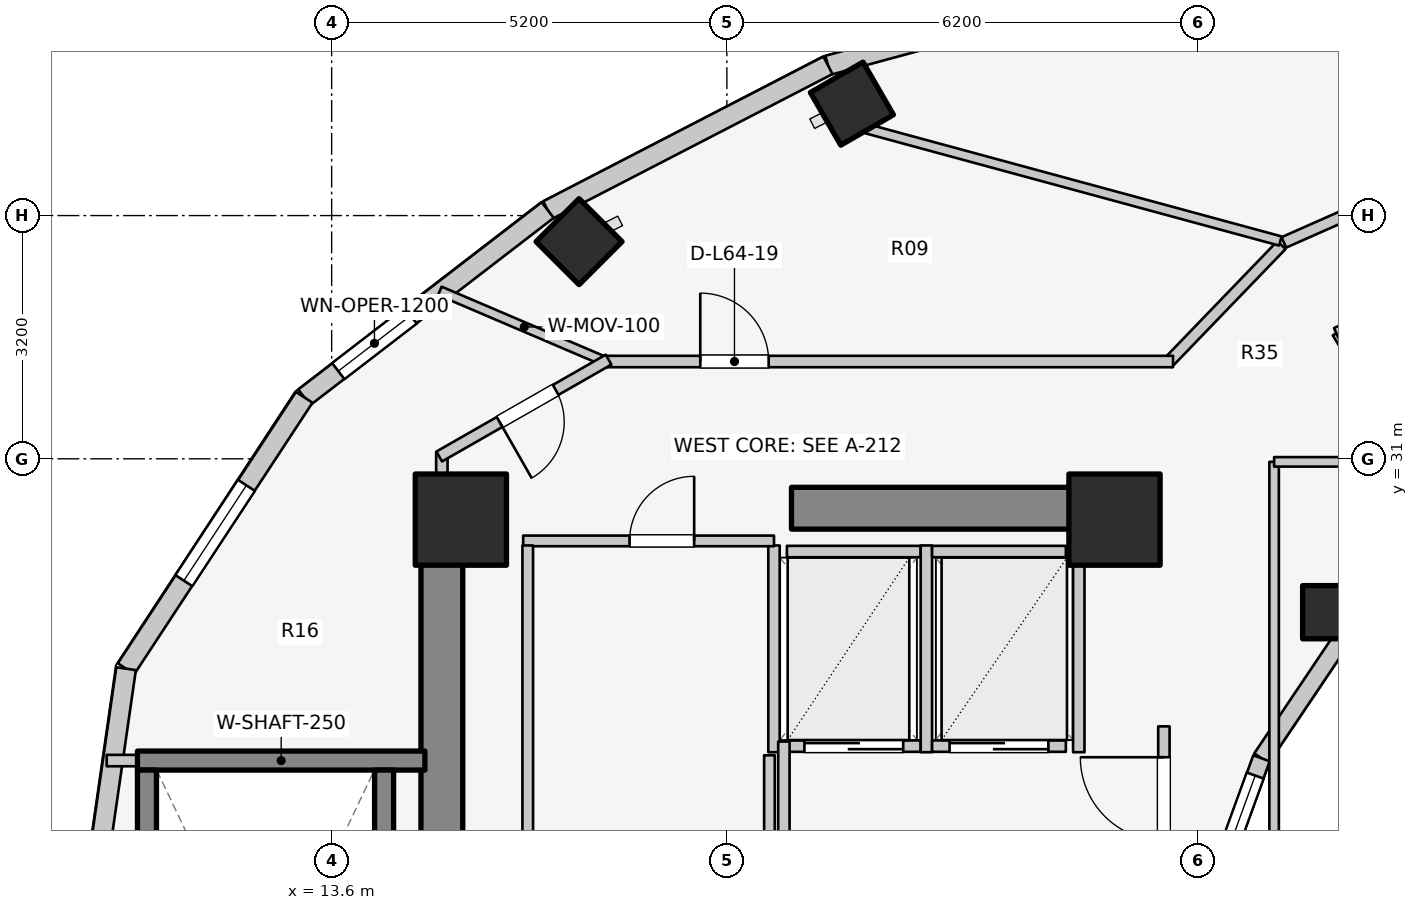
"""IFC4 building model, lengths in metres.
Left out: names, types, materials, properties, quantities, classifications, styles, units other than length and angle.
Written with IfcOpenShell. Run it as: python <this file> out.ifc"""

import sys

from ifc_helpers import new_model, si_unit, direction, frame, frame_2d, origin, origin_2d, place, context, subcontext, project, spatial, rectangle, extrude, element, fill, save


model = new_model("IFC4")
c1 = context("Model", 3, precision=1e-05, world=origin(), true_north=direction((0.0, 1.0)))
c2 = subcontext(c1, "Body", "Model", "MODEL_VIEW")
j1 = project(units=[si_unit("LENGTHUNIT", "METRE"), si_unit("PLANEANGLEUNIT", "RADIAN")], contexts=[c1])
p1 = place(None, origin())
s1 = spatial("IfcSite", under=j1, at=p1, CompositionType="ELEMENT")
p2 = place(p1, origin())
s2 = spatial("IfcBuilding", under=s1, at=p2, CompositionType="ELEMENT")
p3 = place(p2, frame((0.0, 0.0, 210.9)))
s3 = spatial("IfcBuildingStorey", under=s2, at=p3, CompositionType="ELEMENT", Elevation=210.9)
p4 = place(p3, frame((15.05, 17.05, 0.0), z_axis=(0.0, 0.0, 1.0), x_axis=(0.0, 1.0, 0.0)))
e1 = element("IfcWall", 1, at=p4, inside=s3, PredefinedType="SHEAR", context=c2, shape_type="SweptSolid", body=[
    extrude(rectangle(XDim=12.8, YDim=0.55, at=frame_2d((6.4, 0.0))), origin(), (0.0, 0.0, 1.0), 3.1),
])
p5 = place(p3, frame((19.65, 30.35, 0.0), z_axis=(0.0, 0.0, 1.0), x_axis=(1.0, 0.0, 0.0)))
e2 = element("IfcWall", 2, at=p5, inside=s3, PredefinedType="SHEAR", context=c2, shape_type="SweptSolid", body=[
    extrude(rectangle(XDim=4.5, YDim=0.55, at=frame_2d((2.25, 0.0))), origin(), (0.0, 0.0, 1.0), 3.1),
])
p6 = place(p3, frame((11.045, 27.03, 0.0), z_axis=(0.0, 0.0, 1.0), x_axis=(1.0, 0.0, 0.0)))
e3 = element("IfcWall", 3, at=p6, inside=s3, PredefinedType="SOLIDWALL", context=c2, shape_type="SweptSolid", body=[
    extrude(rectangle(XDim=3.782, YDim=0.25, at=frame_2d((1.891, 0.0))), origin(), (0.0, 0.0, 1.0), 3.1),
])
for number, where, z_axis, x_axis in (
    (4, (11.17, 19.095, 0.0), (0.0, 0.0, 1.0), (0.0, 1.0, 0.0)),
    (5, (14.29, 19.095, 0.0), (0.0, 0.0, 1.0), (0.0, 1.0, 0.0)),
):
    element("IfcWall", number, at=place(p3, frame(where, z_axis=z_axis, x_axis=x_axis)), inside=s3, PredefinedType="SOLIDWALL", context=c2, shape_type="SweptSolid", body=[
        extrude(rectangle(XDim=7.81, YDim=0.25, at=frame_2d((3.905, 0.0))), origin(), (0.0, 0.0, 1.0), 3.1),
    ])
for number, where, z_axis, x_axis in (
    (6, (23.9, 30.2, 0.0), (0.0, 0.0, 1.0), (1.0, 0.0, 0.0)),
    (7, (15.3, 30.2, 0.0), (0.0, 0.0, 1.0), (1.0, 0.0, 0.0)),
):
    element("IfcColumn", number, at=place(p3, frame(where, z_axis=z_axis, x_axis=x_axis)), inside=s3, PredefinedType="COLUMN", context=c2, shape_type="SweptSolid", body=[
        extrude(rectangle(XDim=1.2, YDim=1.2, at=origin_2d()), origin(), (0.0, 0.0, 1.0), 3.1),
    ])
p7 = place(p3, frame((20.445, 35.673, 0.0), z_axis=(0.0, 0.0, 1.0), x_axis=(-0.5, 0.866025403784, 0.0)))
e8 = element("IfcColumn", 8, at=p7, inside=s3, PredefinedType="COLUMN", context=c2, shape_type="SweptSolid", body=[
    extrude(rectangle(XDim=0.8, YDim=0.8, at=origin_2d()), origin(), (0.0, 0.0, 1.0), 3.1),
])
p8 = place(p3, frame((26.725, 28.982, 0.0), z_axis=(0.0, 0.0, 1.0), x_axis=(1.0, 0.0, 0.0)))
e9 = element("IfcColumn", 9, at=p8, inside=s3, PredefinedType="COLUMN", context=c2, shape_type="SweptSolid", body=[
    extrude(rectangle(XDim=0.7, YDim=0.7, at=origin_2d()), origin(), (0.0, 0.0, 1.0), 3.1),
])
p9 = place(p3, frame((16.855, 33.857, 0.0), z_axis=(0.0, 0.0, 1.0), x_axis=(-0.707106781187, 0.707106781187, 0.0)))
e10 = element("IfcColumn", 10, at=p9, inside=s3, PredefinedType="COLUMN", context=c2, shape_type="SweptSolid", body=[
    extrude(rectangle(XDim=0.8, YDim=0.8, at=origin_2d()), origin(), (0.0, 0.0, 1.0), 3.1),
])
p10 = place(p3, frame((26.965, 28.742, 0.0), z_axis=(0.0, 0.0, 1.0), x_axis=(-0.558197800898, -0.829707909492, 0.0)))
e11 = element("IfcWall", 11, at=p10, inside=s3, PredefinedType="STANDARD", context=c2, shape_type="SweptSolid", body=[
    extrude(rectangle(XDim=2.027, YDim=0.23, at=frame_2d((1.013, 0.0))), origin(), (0.0, 0.0, 1.0), 2.16),
])
p11 = place(p3, frame((25.834, 27.06, 0.0), z_axis=(0.0, 0.0, 1.0), x_axis=(-0.341423187295, -0.93990968033, 0.0)))
e12 = element("IfcWall", 12, at=p11, inside=s3, PredefinedType="STANDARD", context=c2, shape_type="SweptSolid", body=[
    extrude(rectangle(XDim=2.084, YDim=0.23, at=frame_2d((1.042, 0.0))), origin(), (0.0, 0.0, 1.0), 2.84),
])
p12 = place(p11, frame((0.242, 0.0, 0.85)))
e13 = element("IfcOpeningElement", 13, at=p12, cuts=e12, PredefinedType="OPENING", context=c2, shape_type="SweptSolid", body=[
    extrude(rectangle(XDim=1.6, YDim=1.65, at=frame_2d((0.8, 0.825))), frame((0.0, 0.125, 0.0), z_axis=(0.0, -1.0, 0.0), x_axis=(1.0, 0.0, 0.0)), (0.0, 0.0, 1.0), 0.25),
])
p13 = place(p3, frame((24.957, 37.485, 0.0), z_axis=(0.0, 0.0, 1.0), x_axis=(-0.965213026382, -0.261464746576, 0.0)))
e14 = element("IfcWall", 14, at=p13, inside=s3, PredefinedType="STANDARD", context=c2, shape_type="SweptSolid", body=[
    extrude(rectangle(XDim=5.001, YDim=0.26, at=frame_2d((2.5, 0.0))), origin(), (0.0, 0.0, 1.0), 2.85),
])
p14 = place(p13, frame((1.75, 0.0, 0.75)))
e15 = element("IfcOpeningElement", 15, at=p14, cuts=e14, PredefinedType="OPENING", context=c2, shape_type="SweptSolid", body=[
    extrude(rectangle(XDim=1.5, YDim=1.6, at=frame_2d((0.75, 0.8))), frame((0.0, 0.14, 0.0), z_axis=(0.0, -1.0, 0.0), x_axis=(1.0, 0.0, 0.0)), (0.0, 0.0, 1.0), 0.28),
])
p15 = place(p3, frame((20.13, 36.177, 0.0), z_axis=(0.0, 0.0, 1.0), x_axis=(-0.88849146803, -0.458893137057, 0.0)))
e16 = element("IfcWall", 16, at=p15, inside=s3, PredefinedType="STANDARD", context=c2, shape_type="SweptSolid", body=[
    extrude(rectangle(XDim=4.15, YDim=0.26, at=frame_2d((2.075, 0.0))), origin(), (0.0, 0.0, 1.0), 2.85),
])
p16 = place(p3, frame((16.442, 34.272, 0.0), z_axis=(0.0, 0.0, 1.0), x_axis=(-0.792713817907, -0.609593965603, 0.0)))
e17 = element("IfcWall", 17, at=p16, inside=s3, PredefinedType="STANDARD", context=c2, shape_type="SweptSolid", body=[
    extrude(rectangle(XDim=4.041, YDim=0.26, at=frame_2d((2.021, 0.0))), origin(), (0.0, 0.0, 1.0), 2.85),
])
p17 = place(p16, frame((2.275, 0.0, 0.75)))
e18 = element("IfcOpeningElement", 18, at=p17, cuts=e17, PredefinedType="OPENING", context=c2, shape_type="SweptSolid", body=[
    extrude(rectangle(XDim=1.2, YDim=1.5, at=frame_2d((0.6, 0.75))), frame((0.0, 0.14, 0.0), z_axis=(0.0, -1.0, 0.0), x_axis=(1.0, 0.0, 0.0)), (0.0, 0.0, 1.0), 0.28),
])
p18 = place(p3, frame((13.239, 31.809, 0.0), z_axis=(0.0, 0.0, 1.0), x_axis=(-0.548776305075, -0.835969238064, 0.0)))
e19 = element("IfcWall", 19, at=p18, inside=s3, PredefinedType="STANDARD", context=c2, shape_type="SweptSolid", body=[
    extrude(rectangle(XDim=4.271, YDim=0.26, at=frame_2d((2.135, 0.0))), origin(), (0.0, 0.0, 1.0), 2.85),
])
p19 = place(p18, frame((1.385, 0.0, 0.75)))
e20 = element("IfcOpeningElement", 20, at=p19, cuts=e19, PredefinedType="OPENING", context=c2, shape_type="SweptSolid", body=[
    extrude(rectangle(XDim=1.5, YDim=1.6, at=frame_2d((0.75, 0.8))), frame((0.0, 0.14, 0.0), z_axis=(0.0, -1.0, 0.0), x_axis=(1.0, 0.0, 0.0)), (0.0, 0.0, 1.0), 0.28),
])
p20 = place(p3, frame((10.895, 28.239, 0.0), z_axis=(0.0, 0.0, 1.0), x_axis=(-0.142712754019, -0.989764148593, 0.0)))
e21 = element("IfcWall", 21, at=p20, inside=s3, PredefinedType="STANDARD", context=c2, shape_type="SweptSolid", body=[
    extrude(rectangle(XDim=5.293, YDim=0.26, at=frame_2d((2.646, 0.0))), origin(), (0.0, 0.0, 1.0), 2.85),
])
p21 = place(p20, frame((2.635, 0.0, 0.75)))
e22 = element("IfcOpeningElement", 22, at=p21, cuts=e21, PredefinedType="OPENING", context=c2, shape_type="SweptSolid", body=[
    extrude(rectangle(XDim=1.2, YDim=1.5, at=frame_2d((0.6, 0.75))), frame((0.0, 0.14, 0.0), z_axis=(0.0, -1.0, 0.0), x_axis=(1.0, 0.0, 0.0)), (0.0, 0.0, 1.0), 0.28),
])
p22 = place(p3, frame((19.59, 27.22, 0.0), z_axis=(0.0, 0.0, 1.0), x_axis=(1.0, 0.0, 0.0)))
e23 = element("IfcWall", 23, at=p22, inside=s3, PredefinedType="SOLIDWALL", context=c2, shape_type="SweptSolid", body=[
    extrude(rectangle(XDim=1.76, YDim=0.15, at=frame_2d((0.88, 0.0))), origin(), (0.0, 0.0, 1.0), 2.855),
])
p23 = place(p22, frame((0.23, 0.0, 0.0)))
e24 = element("IfcOpeningElement", 24, at=p23, cuts=e23, PredefinedType="OPENING", context=c2, shape_type="SweptSolid", body=[
    extrude(rectangle(XDim=1.3, YDim=2.1, at=frame_2d((0.65, 1.05))), frame((0.0, 0.085, 0.0), z_axis=(0.0, -1.0, 0.0), x_axis=(1.0, 0.0, 0.0)), (0.0, 0.0, 1.0), 0.17),
])
p24 = place(p3, frame((19.59, 29.78, 0.0), z_axis=(0.0, 0.0, 1.0), x_axis=(1.0, 0.0, 0.0)))
e25 = element("IfcWall", 25, at=p24, inside=s3, PredefinedType="SOLIDWALL", context=c2, shape_type="SweptSolid", body=[
    extrude(rectangle(XDim=1.76, YDim=0.15, at=frame_2d((0.88, 0.0))), origin(), (0.0, 0.0, 1.0), 2.855),
])
for number, where, z_axis, x_axis in (
    (26, (19.42, 27.14, 0.0), (0.0, 0.0, 1.0), (0.0, 1.0, 0.0)),
    (27, (21.425, 27.14, 0.0), (0.0, 0.0, 1.0), (0.0, 1.0, 0.0)),
):
    element("IfcWall", number, at=place(p3, frame(where, z_axis=z_axis, x_axis=x_axis)), inside=s3, PredefinedType="SOLIDWALL", context=c2, shape_type="SweptSolid", body=[
        extrude(rectangle(XDim=2.72, YDim=0.15, at=frame_2d((1.36, 0.0))), origin(), (0.0, 0.0, 1.0), 2.855),
    ])
p25 = place(p3, frame((21.5, 27.22, 0.0), z_axis=(0.0, 0.0, 1.0), x_axis=(1.0, 0.0, 0.0)))
e28 = element("IfcWall", 28, at=p25, inside=s3, PredefinedType="SOLIDWALL", context=c2, shape_type="SweptSolid", body=[
    extrude(rectangle(XDim=1.76, YDim=0.15, at=frame_2d((0.88, 0.0))), origin(), (0.0, 0.0, 1.0), 2.855),
])
p26 = place(p25, frame((0.23, 0.0, 0.0)))
e29 = element("IfcOpeningElement", 29, at=p26, cuts=e28, PredefinedType="OPENING", context=c2, shape_type="SweptSolid", body=[
    extrude(rectangle(XDim=1.3, YDim=2.1, at=frame_2d((0.65, 1.05))), frame((0.0, 0.085, 0.0), z_axis=(0.0, -1.0, 0.0), x_axis=(1.0, 0.0, 0.0)), (0.0, 0.0, 1.0), 0.17),
])
p27 = place(p3, frame((21.5, 29.78, 0.0), z_axis=(0.0, 0.0, 1.0), x_axis=(1.0, 0.0, 0.0)))
e30 = element("IfcWall", 30, at=p27, inside=s3, PredefinedType="SOLIDWALL", context=c2, shape_type="SweptSolid", body=[
    extrude(rectangle(XDim=1.76, YDim=0.15, at=frame_2d((0.88, 0.0))), origin(), (0.0, 0.0, 1.0), 2.855),
])
p28 = place(p3, frame((23.43, 27.14, 0.0), z_axis=(0.0, 0.0, 1.0), x_axis=(0.0, 1.0, 0.0)))
e31 = element("IfcWall", 31, at=p28, inside=s3, PredefinedType="SOLIDWALL", context=c2, shape_type="SweptSolid", body=[
    extrude(rectangle(XDim=2.72, YDim=0.15, at=frame_2d((1.36, 0.0))), origin(), (0.0, 0.0, 1.0), 2.855),
])
p29 = place(p3, frame((19.55, 24.08, 0.0), z_axis=(0.0, 0.0, 1.0), x_axis=(0.0, 1.0, 0.0)))
e32 = element("IfcWall", 32, at=p29, inside=s3, PredefinedType="PARTITIONING", context=c2, shape_type="SweptSolid", body=[
    extrude(rectangle(XDim=3.2, YDim=0.15, at=frame_2d((1.6, 0.0))), origin(), (0.0, 0.0, 1.0), 2.855),
])
p30 = place(p3, frame((24.55, 24.08, 0.0), z_axis=(0.0, 0.0, 1.0), x_axis=(0.0, 1.0, 0.0)))
e33 = element("IfcWall", 33, at=p30, inside=s3, PredefinedType="PARTITIONING", context=c2, shape_type="SweptSolid", body=[
    extrude(rectangle(XDim=3.4, YDim=0.15, at=frame_2d((1.7, 0.0))), origin(), (0.0, 0.0, 1.0), 2.855),
])
p31 = place(p30, frame((1.894, 0.0, 0.0)))
e34 = element("IfcOpeningElement", 34, at=p31, cuts=e33, PredefinedType="OPENING", context=c2, shape_type="SweptSolid", body=[
    extrude(rectangle(XDim=1.1, YDim=2.1, at=frame_2d((0.55, 1.05))), frame((0.0, 0.085, 0.0), z_axis=(0.0, -1.0, 0.0), x_axis=(1.0, 0.0, 0.0)), (0.0, 0.0, 1.0), 0.17),
])
p32 = place(p3, frame((16.12, 29.92, 0.0), z_axis=(0.0, 0.0, 1.0), x_axis=(1.0, 0.0, 0.0)))
e35 = element("IfcWall", 35, at=p32, inside=s3, PredefinedType="PLUMBINGWALL", context=c2, shape_type="SweptSolid", body=[
    extrude(rectangle(XDim=3.3, YDim=0.14, at=frame_2d((1.65, 0.0))), origin(), (0.0, 0.0, 1.0), 2.855),
])
p33 = place(p32, frame((1.399, 0.0, 0.0)))
e36 = element("IfcOpeningElement", 36, at=p33, cuts=e35, PredefinedType="OPENING", context=c2, shape_type="SweptSolid", body=[
    extrude(rectangle(XDim=0.85, YDim=2.05, at=frame_2d((0.425, 1.025))), frame((0.0, 0.08, 0.0), z_axis=(0.0, -1.0, 0.0), x_axis=(1.0, 0.0, 0.0)), (0.0, 0.0, 1.0), 0.16),
])
p34 = place(p3, frame((16.18, 25.98, 0.0), z_axis=(0.0, 0.0, 1.0), x_axis=(0.0, 1.0, 0.0)))
e37 = element("IfcWall", 37, at=p34, inside=s3, PredefinedType="PLUMBINGWALL", context=c2, shape_type="SweptSolid", body=[
    extrude(rectangle(XDim=3.88, YDim=0.14, at=frame_2d((1.94, 0.0))), origin(), (0.0, 0.0, 1.0), 2.855),
])
p35 = place(p3, frame((19.36, 25.98, 0.0), z_axis=(0.0, 0.0, 1.0), x_axis=(0.0, 1.0, 0.0)))
e38 = element("IfcWall", 38, at=p35, inside=s3, PredefinedType="PLUMBINGWALL", context=c2, shape_type="SweptSolid", body=[
    extrude(rectangle(XDim=1.12, YDim=0.14, at=frame_2d((0.56, 0.0))), origin(), (0.0, 0.0, 1.0), 2.855),
])
p36 = place(p3, frame((28.45, 30.015, 0.0), z_axis=(0.0, 0.0, 1.0), x_axis=(-0.523992004803, 0.851723182086, 0.0)))
e39 = element("IfcWall", 39, at=p36, inside=s3, PredefinedType="PARTITIONING", context=c2, shape_type="SweptSolid", body=[
    extrude(rectangle(XDim=3.101, YDim=0.125, at=frame_2d((1.551, 0.0))), origin(), (0.0, 0.0, 1.0), 2.376),
])
p37 = place(p3, frame((29.323, 33.771, 0.0), z_axis=(0.0, 0.0, 1.0), x_axis=(-0.913120130558, -0.407690602257, 0.0)))
e40 = element("IfcWall", 40, at=p37, inside=s3, PredefinedType="PARTITIONING", context=c2, shape_type="SweptSolid", body=[
    extrude(rectangle(XDim=2.743, YDim=0.15, at=frame_2d((1.371, 0.0))), origin(), (0.0, 0.0, 1.0), 2.376),
])
p38 = place(p37, frame((0.896, 0.0, 0.0)))
e41 = element("IfcOpeningElement", 41, at=p38, cuts=e40, PredefinedType="OPENING", context=c2, shape_type="SweptSolid", body=[
    extrude(rectangle(XDim=0.95, YDim=2.1, at=frame_2d((0.475, 1.05))), frame((0.0, 0.085, 0.0), z_axis=(0.0, -1.0, 0.0), x_axis=(1.0, 0.0, 0.0)), (0.0, 0.0, 1.0), 0.17),
])
p39 = place(p3, frame((26.0, 25.8, 0.0), z_axis=(0.0, 0.0, 1.0), x_axis=(0.0, 1.0, 0.0)))
e42 = element("IfcWall", 42, at=p39, inside=s3, PredefinedType="PARTITIONING", context=c2, shape_type="SweptSolid", body=[
    extrude(rectangle(XDim=5.16, YDim=0.125, at=frame_2d((2.58, 0.0))), origin(), (0.0, 0.0, 1.0), 2.232),
])
p40 = place(p3, frame((26.0, 30.96, 0.0), z_axis=(0.0, 0.0, 1.0), x_axis=(1.0, 0.0, 0.0)))
e43 = element("IfcWall", 43, at=p40, inside=s3, PredefinedType="PARTITIONING", context=c2, shape_type="SweptSolid", body=[
    extrude(rectangle(XDim=2.6, YDim=0.125, at=frame_2d((1.3, 0.0))), origin(), (0.0, 0.0, 1.0), 2.376),
])
p41 = place(p3, frame((10.64, 27.03, 0.0), z_axis=(0.0, 0.0, 1.0), x_axis=(1.0, 0.0, 0.0)))
e44 = element("IfcWall", 44, at=p41, inside=s3, PredefinedType="PARTITIONING", context=c2, shape_type="SweptSolid", body=[
    extrude(rectangle(XDim=0.4, YDim=0.15, at=frame_2d((0.2, 0.0))), origin(), (0.0, 0.0, 1.0), 2.855),
])
p42 = place(p3, frame((15.05, 29.8, 0.0), z_axis=(0.0, 0.0, 1.0), x_axis=(0.0, 1.0, 0.0)))
e45 = element("IfcWall", 45, at=p42, inside=s3, PredefinedType="PARTITIONING", context=c2, shape_type="SweptSolid", body=[
    extrude(rectangle(XDim=1.29, YDim=0.15, at=frame_2d((0.645, 0.0))), origin(), (0.0, 0.0, 1.0), 2.855),
])
p43 = place(p3, frame((17.246, 32.26, 0.0), z_axis=(0.0, 0.0, 1.0), x_axis=(-0.919666784939, 0.39269963672, 0.0)))
e46 = element("IfcWall", 46, at=p43, inside=s3, PredefinedType="MOVABLE", context=c2, shape_type="SweptSolid", body=[
    extrude(rectangle(XDim=2.417, YDim=0.12, at=frame_2d((1.208, 0.0))), origin(), (0.0, 0.0, 1.0), 2.22),
])
p44 = place(p3, frame((26.097, 33.812, 0.0), z_axis=(0.0, 0.0, 1.0), x_axis=(-0.694032962553, -0.719943224768, 0.0)))
e47 = element("IfcWall", 47, at=p44, inside=s3, PredefinedType="PARTITIONING", context=c2, shape_type="SweptSolid", body=[
    extrude(rectangle(XDim=2.158, YDim=0.15, at=frame_2d((1.079, 0.0))), origin(), (0.0, 0.0, 1.0), 2.376),
])
p45 = place(p3, frame((17.15, 32.28, 0.0), z_axis=(0.0, 0.0, 1.0), x_axis=(1.0, 0.0, 0.0)))
e48 = element("IfcWall", 48, at=p45, inside=s3, PredefinedType="PARTITIONING", context=c2, shape_type="SweptSolid", body=[
    extrude(rectangle(XDim=7.52, YDim=0.15, at=frame_2d((3.76, 0.0))), origin(), (0.0, 0.0, 1.0), 2.376),
])
p46 = place(p45, frame((1.3, 0.0, 0.0)))
e49 = element("IfcOpeningElement", 49, at=p46, cuts=e48, PredefinedType="OPENING", context=c2, shape_type="SweptSolid", body=[
    extrude(rectangle(XDim=0.9, YDim=2.1, at=frame_2d((0.45, 1.05))), frame((0.0, 0.085, 0.0), z_axis=(0.0, -1.0, 0.0), x_axis=(1.0, 0.0, 0.0)), (0.0, 0.0, 1.0), 0.17),
])
p47 = place(p3, frame((17.243, 32.305, 0.0), z_axis=(0.0, 0.0, 1.0), x_axis=(-0.867991349648, -0.496579315857, 0.0)))
e50 = element("IfcWall", 50, at=p47, inside=s3, PredefinedType="PARTITIONING", context=c2, shape_type="SweptSolid", body=[
    extrude(rectangle(XDim=2.567, YDim=0.15, at=frame_2d((1.283, 0.0))), origin(), (0.0, 0.0, 1.0), 2.22),
])
p48 = place(p47, frame((0.802, 0.0, 0.0)))
e51 = element("IfcOpeningElement", 51, at=p48, cuts=e50, PredefinedType="OPENING", context=c2, shape_type="SweptSolid", body=[
    extrude(rectangle(XDim=0.85, YDim=2.05, at=frame_2d((0.425, 1.025))), frame((0.0, 0.085, 0.0), z_axis=(0.0, -1.0, 0.0), x_axis=(1.0, 0.0, 0.0)), (0.0, 0.0, 1.0), 0.17),
])
p49 = place(p3, frame((26.082, 33.866, 0.0), z_axis=(0.0, 0.0, 1.0), x_axis=(-0.965109390289, 0.261847025523, 0.0)))
e52 = element("IfcWall", 52, at=p49, inside=s3, PredefinedType="PARTITIONING", context=c2, shape_type="SweptSolid", body=[
    extrude(rectangle(XDim=5.644, YDim=0.125, at=frame_2d((2.822, 0.0))), origin(), (0.0, 0.0, 1.0), 2.376),
])
p50 = place(p3, frame((28.972, 35.105, 0.0), z_axis=(0.0, 0.0, 1.0), x_axis=(-0.914490094652, -0.40460828808, 0.0)))
e53 = element("IfcWall", 53, at=p50, inside=s3, PredefinedType="PARTITIONING", context=c2, shape_type="SweptSolid", body=[
    extrude(rectangle(XDim=3.11, YDim=0.15, at=frame_2d((1.555, 0.0))), origin(), (0.0, 0.0, 1.0), 2.376),
])
p51 = place(p50, frame((1.055, 0.0, 0.0)))
e54 = element("IfcOpeningElement", 54, at=p51, cuts=e53, PredefinedType="OPENING", context=c2, shape_type="SweptSolid", body=[
    extrude(rectangle(XDim=1.0, YDim=2.1, at=frame_2d((0.5, 1.05))), frame((0.0, 0.085, 0.0), z_axis=(0.0, -1.0, 0.0), x_axis=(1.0, 0.0, 0.0)), (0.0, 0.0, 1.0), 0.17),
])
p52 = place(p12, origin())
e55 = element("IfcWindow", 55, at=p52, inside=s3, PartitioningType="SINGLE_PANEL", PredefinedType="WINDOW", context=c2, shape_type="SweptSolid", body=[
    extrude(rectangle(XDim=1.6, YDim=1.65, at=frame_2d((0.8, 0.825))), frame((0.0, 0.03, 0.0), z_axis=(0.0, -1.0, 0.0), x_axis=(1.0, 0.0, 0.0)), (0.0, 0.0, 1.0), 0.06),
])
fill(e13, e55)
p53 = place(p17, origin())
e56 = element("IfcWindow", 56, at=p53, inside=s3, PartitioningType="SINGLE_PANEL", PredefinedType="WINDOW", context=c2, shape_type="SweptSolid", body=[
    extrude(rectangle(XDim=1.2, YDim=1.5, at=frame_2d((0.6, 0.75))), frame((0.0, 0.03, 0.0), z_axis=(0.0, -1.0, 0.0), x_axis=(1.0, 0.0, 0.0)), (0.0, 0.0, 1.0), 0.06),
])
fill(e18, e56)
p54 = place(p19, origin())
e57 = element("IfcWindow", 57, at=p54, inside=s3, PartitioningType="SINGLE_PANEL", PredefinedType="WINDOW", context=c2, shape_type="SweptSolid", body=[
    extrude(rectangle(XDim=1.5, YDim=1.6, at=frame_2d((0.75, 0.8))), frame((0.0, 0.03, 0.0), z_axis=(0.0, -1.0, 0.0), x_axis=(1.0, 0.0, 0.0)), (0.0, 0.0, 1.0), 0.06),
])
fill(e20, e57)
p55 = place(p23, origin())
e58 = element("IfcDoor", 58, at=p55, inside=s3, OperationType="DOUBLE_DOOR_SLIDING", PredefinedType="DOOR", context=c2, shape_type="SweptSolid", body=[
    extrude(rectangle(XDim=1.3, YDim=2.1, at=frame_2d((0.65, 1.05))), frame((0.0, 0.025, 0.0), z_axis=(0.0, -1.0, 0.0), x_axis=(1.0, 0.0, 0.0)), (0.0, 0.0, 1.0), 0.05),
])
fill(e24, e58)
p56 = place(p26, origin())
e59 = element("IfcDoor", 59, at=p56, inside=s3, OperationType="DOUBLE_DOOR_SLIDING", PredefinedType="DOOR", context=c2, shape_type="SweptSolid", body=[
    extrude(rectangle(XDim=1.3, YDim=2.1, at=frame_2d((0.65, 1.05))), frame((0.0, 0.025, 0.0), z_axis=(0.0, -1.0, 0.0), x_axis=(1.0, 0.0, 0.0)), (0.0, 0.0, 1.0), 0.05),
])
fill(e29, e59)
p57 = place(p31, origin())
e60 = element("IfcDoor", 60, at=p57, inside=s3, OperationType="SINGLE_SWING_RIGHT", PredefinedType="DOOR", context=c2, shape_type="SweptSolid", body=[
    extrude(rectangle(XDim=1.1, YDim=2.1, at=frame_2d((0.55, 1.05))), frame((0.0, 0.025, 0.0), z_axis=(0.0, -1.0, 0.0), x_axis=(1.0, 0.0, 0.0)), (0.0, 0.0, 1.0), 0.05),
])
fill(e34, e60)
p58 = place(p33, origin())
e61 = element("IfcDoor", 61, at=p58, inside=s3, OperationType="SINGLE_SWING_RIGHT", PredefinedType="DOOR", context=c2, shape_type="SweptSolid", body=[
    extrude(rectangle(XDim=0.85, YDim=2.05, at=frame_2d((0.425, 1.025))), frame((0.0, 0.025, 0.0), z_axis=(0.0, -1.0, 0.0), x_axis=(1.0, 0.0, 0.0)), (0.0, 0.0, 1.0), 0.05),
])
fill(e36, e61)
p59 = place(p46, origin())
e62 = element("IfcDoor", 62, at=p59, inside=s3, OperationType="SINGLE_SWING_LEFT", PredefinedType="DOOR", context=c2, shape_type="SweptSolid", body=[
    extrude(rectangle(XDim=0.9, YDim=2.1, at=frame_2d((0.45, 1.05))), frame((0.0, 0.025, 0.0), z_axis=(0.0, -1.0, 0.0), x_axis=(1.0, 0.0, 0.0)), (0.0, 0.0, 1.0), 0.05),
])
fill(e49, e62)
p60 = place(p48, origin())
e63 = element("IfcDoor", 63, at=p60, inside=s3, OperationType="SINGLE_SWING_RIGHT", PredefinedType="DOOR", context=c2, shape_type="SweptSolid", body=[
    extrude(rectangle(XDim=0.85, YDim=2.05, at=frame_2d((0.425, 1.025))), frame((0.0, 0.025, 0.0), z_axis=(0.0, -1.0, 0.0), x_axis=(1.0, 0.0, 0.0)), (0.0, 0.0, 1.0), 0.05),
])
fill(e51, e63)
save(model, sys.argv[1])
